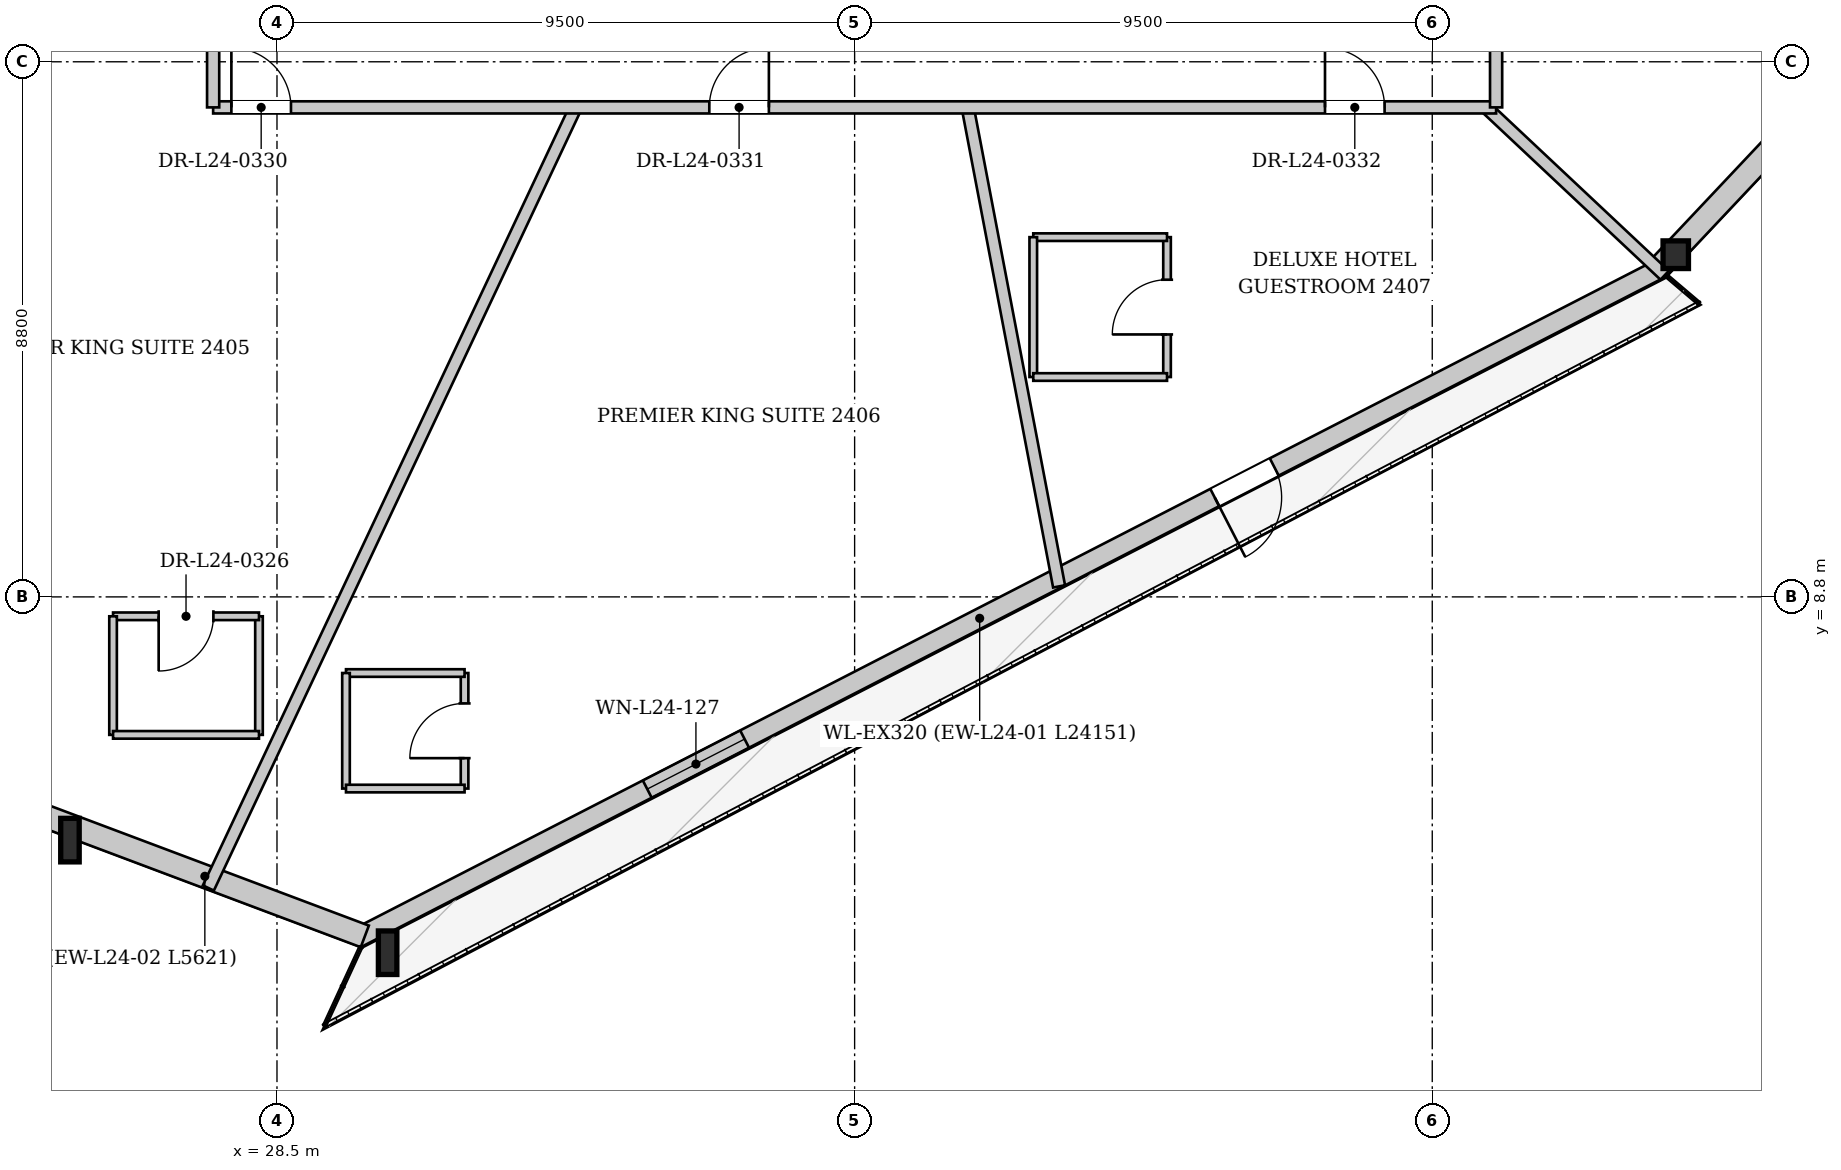
"""IFC4 building model, lengths in metres.
Left out: names, types, materials, properties, quantities, classifications, styles, units other than length and angle.
Written with IfcOpenShell. Run it as: python <this file> out.ifc"""

import sys

from ifc_helpers import new_model, si_unit, direction, frame, frame_2d, origin, origin_2d, place, context, subcontext, project, spatial, rectangle, i_section, extrude, source, transform, mapped, element, fill, save


model = new_model("IFC4")
c1 = context("Model", 3, precision=1e-05, world=origin(), true_north=direction((0.0, 1.0)))
c2 = subcontext(c1, "Body", "Model", "MODEL_VIEW")
j1 = project(units=[si_unit("LENGTHUNIT", "METRE"), si_unit("PLANEANGLEUNIT", "RADIAN")], contexts=[c1])
p1 = place(None, origin())
s1 = spatial("IfcSite", under=j1, at=p1, CompositionType="ELEMENT")
p2 = place(p1, origin())
s2 = spatial("IfcBuilding", under=s1, at=p2, CompositionType="ELEMENT")
p3 = place(p2, frame((0.0, 0.0, 95.05)))
s3 = spatial("IfcBuildingStorey", under=s2, at=p3, CompositionType="ELEMENT", Elevation=95.05)
m1 = source(origin(), c2, "Body", "SweptSolid", [
    extrude(i_section(OverallWidth=0.304, OverallDepth=0.716, WebThickness=0.021, FlangeThickness=0.04, at=origin_2d()), origin(), (0.0, 0.0, 1.0), 3.544),
])
p4 = place(p3, frame((24.616, 5.016, 0.0), z_axis=(0.270218966562, -0.122056591575, 0.955030836446), x_axis=(0.411648964628, 0.911342487718, 0.0)))
e1 = element("IfcColumn", 1, at=p4, inside=s3, PredefinedType="COLUMN", context=c2, shape_type="MappedRepresentation", body=[
    mapped(m1, transform((0.0, 0.0, 0.0), x_axis=(1.0, 0.0, 0.0), y_axis=(0.0, 1.0, 0.0), z_axis=(0.0, 0.0, 1.0), scale=1.0)),
])
m2 = source(origin(), c2, "Body", "SweptSolid", [
    extrude(i_section(OverallWidth=0.304, OverallDepth=0.716, WebThickness=0.021, FlangeThickness=0.04, at=origin_2d()), origin(), (0.0, 0.0, 1.0), 3.503),
])
p5 = place(p3, frame((29.877, 3.039, 0.0), z_axis=(0.25241508532, -0.051570172042, 0.966243831576), x_axis=(0.200171996635, 0.979760772721, 0.0)))
e2 = element("IfcColumn", 2, at=p5, inside=s3, PredefinedType="COLUMN", context=c2, shape_type="MappedRepresentation", body=[
    mapped(m2, transform((0.0, 0.0, 0.0), x_axis=(1.0, 0.0, 0.0), y_axis=(0.0, 1.0, 0.0), z_axis=(0.0, 0.0, 1.0), scale=1.0)),
])
m3 = source(origin(), c2, "Body", "SweptSolid", [
    extrude(i_section(OverallWidth=0.418, OverallDepth=0.455, WebThickness=0.038, FlangeThickness=0.059, at=origin_2d()), origin(), (0.0, 0.0, 1.0), 3.47),
])
p6 = place(p3, frame((51.359, 14.074, 0.0), z_axis=(0.083866504635, 0.203334059058, 0.975510978835), x_axis=(-0.924452695852, 0.381296752061, 0.0)))
e3 = element("IfcColumn", 3, at=p6, inside=s3, PredefinedType="COLUMN", context=c2, shape_type="MappedRepresentation", body=[
    mapped(m3, transform((0.0, 0.0, 0.0), x_axis=(1.0, 0.0, 0.0), y_axis=(0.0, 1.0, 0.0), z_axis=(0.0, 0.0, 1.0), scale=1.0)),
])
p7 = place(p3, frame((51.286, 14.217, 0.0), z_axis=(0.0, 0.0, 1.0), x_axis=(-0.889491175816, -0.456952347785, 0.0)))
e4 = element("IfcWall", 4, at=p7, inside=s3, PredefinedType="SOLIDWALL", context=c2, shape_type="SweptSolid", body=[
    extrude(rectangle(XDim=24.151, YDim=0.32, at=frame_2d((12.075, 0.0))), origin(), (0.0, 0.0, 1.0), 2.692),
])
p8 = place(p7, frame((7.178, 0.0, 0.0)))
e5 = element("IfcOpeningElement", 5, at=p8, cuts=e4, PredefinedType="OPENING", context=c2, shape_type="SweptSolid", body=[
    extrude(rectangle(XDim=1.1, YDim=2.3, at=frame_2d((0.55, 1.15))), frame((0.0, 0.17, 0.0), z_axis=(0.0, -1.0, 0.0), x_axis=(1.0, 0.0, 0.0)), (0.0, 0.0, 1.0), 0.34),
])
p9 = place(p7, frame((16.971, 0.0, 0.372)))
e6 = element("IfcOpeningElement", 6, at=p9, cuts=e4, PredefinedType="OPENING", context=c2, shape_type="SweptSolid", body=[
    extrude(rectangle(XDim=1.8, YDim=2.2, at=frame_2d((0.9, 1.1))), frame((0.0, 0.17, 0.0), z_axis=(0.0, -1.0, 0.0), x_axis=(1.0, 0.0, 0.0)), (0.0, 0.0, 1.0), 0.34),
])
p10 = place(p3, frame((29.944, 3.217, 0.0), z_axis=(0.0, 0.0, 1.0), x_axis=(-0.936080825312, 0.351785003211, 0.0)))
e7 = element("IfcWall", 7, at=p10, inside=s3, PredefinedType="SOLIDWALL", context=c2, shape_type="SweptSolid", body=[
    extrude(rectangle(XDim=5.621, YDim=0.38, at=frame_2d((2.811, 0.0))), origin(), (0.0, 0.0, 1.0), 2.692),
])
p11 = place(p3, frame((67.781, 31.783, 0.0), z_axis=(0.0, 0.0, 1.0), x_axis=(-0.68571495336, -0.727870182614, 0.0)))
e8 = element("IfcWall", 8, at=p11, inside=s3, PredefinedType="SOLIDWALL", context=c2, shape_type="SweptSolid", body=[
    extrude(rectangle(XDim=24.15, YDim=0.38, at=frame_2d((12.075, 0.0))), origin(), (0.0, 0.0, 1.0), 2.692),
])
p12 = place(p11, frame((5.662, 0.0, 0.322)))
e9 = element("IfcOpeningElement", 9, at=p12, cuts=e8, PredefinedType="OPENING", context=c2, shape_type="SweptSolid", body=[
    extrude(rectangle(XDim=2.2, YDim=2.25, at=frame_2d((1.1, 1.125))), frame((0.0, 0.2, 0.0), z_axis=(0.0, -1.0, 0.0), x_axis=(1.0, 0.0, 0.0)), (0.0, 0.0, 1.0), 0.4),
])
p13 = place(p11, frame((16.288, 0.0, 0.322)))
e10 = element("IfcOpeningElement", 10, at=p13, cuts=e8, PredefinedType="OPENING", context=c2, shape_type="SweptSolid", body=[
    extrude(rectangle(XDim=2.2, YDim=2.25, at=frame_2d((1.1, 1.125))), frame((0.0, 0.2, 0.0), z_axis=(0.0, -1.0, 0.0), x_axis=(1.0, 0.0, 0.0)), (0.0, 0.0, 1.0), 0.4),
])
p14 = place(p3, frame((27.45, 20.8, 0.0), z_axis=(0.0, 0.0, 1.0), x_axis=(-0.876309701185, -0.481748178625, 0.0)))
e11 = element("IfcWall", 11, at=p14, inside=s3, PredefinedType="PARTITIONING", context=c2, shape_type="SweptSolid", body=[
    extrude(rectangle(XDim=9.176, YDim=0.2, at=frame_2d((4.588, 0.0))), origin(), (0.0, 0.0, 1.0), 3.3),
])
p15 = place(p3, frame((33.412, 16.85, 0.0), z_axis=(0.0, 0.0, 1.0), x_axis=(-0.425776318431, -0.904828451511, 0.0)))
e12 = element("IfcWall", 12, at=p15, inside=s3, PredefinedType="PARTITIONING", context=c2, shape_type="SweptSolid", body=[
    extrude(rectangle(XDim=14.188, YDim=0.2, at=frame_2d((7.094, 0.0))), origin(), (0.0, 0.0, 1.0), 3.3),
])
p16 = place(p3, frame((39.86, 16.85, 0.0), z_axis=(0.0, 0.0, 1.0), x_axis=(0.187379297004, -0.982287635601, 0.0)))
e13 = element("IfcWall", 13, at=p16, inside=s3, PredefinedType="PARTITIONING", context=c2, shape_type="SweptSolid", body=[
    extrude(rectangle(XDim=8.02, YDim=0.2, at=frame_2d((4.01, 0.0))), origin(), (0.0, 0.0, 1.0), 3.3),
])
p17 = place(p3, frame((48.383, 16.85, 0.0), z_axis=(0.0, 0.0, 1.0), x_axis=(0.728946019142, -0.684571180505, 0.0)))
e14 = element("IfcWall", 14, at=p17, inside=s3, PredefinedType="PARTITIONING", context=c2, shape_type="SweptSolid", body=[
    extrude(rectangle(XDim=4.033, YDim=0.2, at=frame_2d((2.016, 0.0))), origin(), (0.0, 0.0, 1.0), 3.3),
])
p18 = place(p3, frame((28.204, 6.531, 0.0), z_axis=(0.0, 0.0, 1.0), x_axis=(0.0, 1.0, 0.0)))
e15 = element("IfcWall", 15, at=p18, inside=s3, PredefinedType="PARTITIONING", context=c2, shape_type="SweptSolid", body=[
    extrude(rectangle(XDim=1.95, YDim=0.125, at=frame_2d((0.975, 0.0))), origin(), (0.0, 0.0, 1.0), 3.3),
])
p19 = place(p3, frame((28.204, 8.481, 0.0), z_axis=(0.0, 0.0, 1.0), x_axis=(-1.0, 0.0, 0.0)))
e16 = element("IfcWall", 16, at=p19, inside=s3, PredefinedType="PARTITIONING", context=c2, shape_type="SweptSolid", body=[
    extrude(rectangle(XDim=2.4, YDim=0.125, at=frame_2d((1.2, 0.0))), origin(), (0.0, 0.0, 1.0), 3.3),
])
p20 = place(p19, frame((0.75, 0.0, 0.0)))
e17 = element("IfcOpeningElement", 17, at=p20, cuts=e16, PredefinedType="OPENING", context=c2, shape_type="SweptSolid", body=[
    extrude(rectangle(XDim=0.9, YDim=2.1, at=frame_2d((0.45, 1.05))), frame((0.0, 0.073, 0.0), z_axis=(0.0, -1.0, 0.0), x_axis=(1.0, 0.0, 0.0)), (0.0, 0.0, 1.0), 0.145),
])
p21 = place(p3, frame((25.804, 8.481, 0.0), z_axis=(0.0, 0.0, 1.0), x_axis=(0.0, -1.0, 0.0)))
e18 = element("IfcWall", 18, at=p21, inside=s3, PredefinedType="PARTITIONING", context=c2, shape_type="SweptSolid", body=[
    extrude(rectangle(XDim=1.95, YDim=0.125, at=frame_2d((0.975, 0.0))), origin(), (0.0, 0.0, 1.0), 3.3),
])
p22 = place(p3, frame((25.804, 6.531, 0.0), z_axis=(0.0, 0.0, 1.0), x_axis=(1.0, 0.0, 0.0)))
e19 = element("IfcWall", 19, at=p22, inside=s3, PredefinedType="PARTITIONING", context=c2, shape_type="SweptSolid", body=[
    extrude(rectangle(XDim=2.4, YDim=0.125, at=frame_2d((1.2, 0.0))), origin(), (0.0, 0.0, 1.0), 3.3),
])
p23 = place(p3, frame((31.585, 5.648, 0.0), z_axis=(0.0, 0.0, 1.0), x_axis=(0.0, 1.0, 0.0)))
e20 = element("IfcWall", 20, at=p23, inside=s3, PredefinedType="PARTITIONING", context=c2, shape_type="SweptSolid", body=[
    extrude(rectangle(XDim=1.9, YDim=0.125, at=frame_2d((0.95, 0.0))), origin(), (0.0, 0.0, 1.0), 2.795),
])
p24 = place(p23, frame((0.5, 0.0, 0.0)))
e21 = element("IfcOpeningElement", 21, at=p24, cuts=e20, PredefinedType="OPENING", context=c2, shape_type="SweptSolid", body=[
    extrude(rectangle(XDim=0.9, YDim=2.1, at=frame_2d((0.45, 1.05))), frame((0.0, 0.073, 0.0), z_axis=(0.0, -1.0, 0.0), x_axis=(1.0, 0.0, 0.0)), (0.0, 0.0, 1.0), 0.145),
])
p25 = place(p3, frame((31.585, 7.548, 0.0), z_axis=(0.0, 0.0, 1.0), x_axis=(-1.0, 0.0, 0.0)))
e22 = element("IfcWall", 22, at=p25, inside=s3, PredefinedType="PARTITIONING", context=c2, shape_type="SweptSolid", body=[
    extrude(rectangle(XDim=1.95, YDim=0.125, at=frame_2d((0.975, 0.0))), origin(), (0.0, 0.0, 1.0), 3.3),
])
p26 = place(p3, frame((29.635, 7.548, 0.0), z_axis=(0.0, 0.0, 1.0), x_axis=(0.0, -1.0, 0.0)))
e23 = element("IfcWall", 23, at=p26, inside=s3, PredefinedType="PARTITIONING", context=c2, shape_type="SweptSolid", body=[
    extrude(rectangle(XDim=1.9, YDim=0.125, at=frame_2d((0.95, 0.0))), origin(), (0.0, 0.0, 1.0), 3.3),
])
p27 = place(p3, frame((29.635, 5.648, 0.0), z_axis=(0.0, 0.0, 1.0), x_axis=(1.0, 0.0, 0.0)))
e24 = element("IfcWall", 24, at=p27, inside=s3, PredefinedType="PARTITIONING", context=c2, shape_type="SweptSolid", body=[
    extrude(rectangle(XDim=1.95, YDim=0.125, at=frame_2d((0.975, 0.0))), origin(), (0.0, 0.0, 1.0), 3.3),
])
p28 = place(p3, frame((43.138, 12.416, 0.0), z_axis=(0.0, 0.0, 1.0), x_axis=(0.0, 1.0, 0.0)))
e25 = element("IfcWall", 25, at=p28, inside=s3, PredefinedType="PARTITIONING", context=c2, shape_type="SweptSolid", body=[
    extrude(rectangle(XDim=2.3, YDim=0.125, at=frame_2d((1.15, 0.0))), origin(), (0.0, 0.0, 1.0), 3.3),
])
p29 = place(p28, frame((0.7, 0.0, 0.0)))
e26 = element("IfcOpeningElement", 26, at=p29, cuts=e25, PredefinedType="OPENING", context=c2, shape_type="SweptSolid", body=[
    extrude(rectangle(XDim=0.9, YDim=2.1, at=frame_2d((0.45, 1.05))), frame((0.0, 0.073, 0.0), z_axis=(0.0, -1.0, 0.0), x_axis=(1.0, 0.0, 0.0)), (0.0, 0.0, 1.0), 0.145),
])
p30 = place(p3, frame((43.138, 14.716, 0.0), z_axis=(0.0, 0.0, 1.0), x_axis=(-1.0, 0.0, 0.0)))
e27 = element("IfcWall", 27, at=p30, inside=s3, PredefinedType="PARTITIONING", context=c2, shape_type="SweptSolid", body=[
    extrude(rectangle(XDim=2.2, YDim=0.125, at=frame_2d((1.1, 0.0))), origin(), (0.0, 0.0, 1.0), 3.3),
])
p31 = place(p3, frame((40.938, 14.716, 0.0), z_axis=(0.0, 0.0, 1.0), x_axis=(0.0, -1.0, 0.0)))
e28 = element("IfcWall", 28, at=p31, inside=s3, PredefinedType="PARTITIONING", context=c2, shape_type="SweptSolid", body=[
    extrude(rectangle(XDim=2.3, YDim=0.125, at=frame_2d((1.15, 0.0))), origin(), (0.0, 0.0, 1.0), 3.3),
])
p32 = place(p3, frame((40.938, 12.416, 0.0), z_axis=(0.0, 0.0, 1.0), x_axis=(1.0, 0.0, 0.0)))
e29 = element("IfcWall", 29, at=p32, inside=s3, PredefinedType="PARTITIONING", context=c2, shape_type="SweptSolid", body=[
    extrude(rectangle(XDim=2.2, YDim=0.125, at=frame_2d((1.1, 0.0))), origin(), (0.0, 0.0, 1.0), 3.3),
])
p33 = place(p3, frame((27.45, 16.85, 0.0), z_axis=(0.0, 0.0, 1.0), x_axis=(1.0, 0.0, 0.0)))
e30 = element("IfcWall", 30, at=p33, inside=s3, PredefinedType="PARTITIONING", context=c2, shape_type="SweptSolid", body=[
    extrude(rectangle(XDim=21.1, YDim=0.2, at=frame_2d((10.55, 0.0))), origin(), (0.0, 0.0, 1.0), 3.3),
])
p34 = place(p33, frame((0.3, 0.0, 0.0)))
e31 = element("IfcOpeningElement", 31, at=p34, cuts=e30, PredefinedType="OPENING", context=c2, shape_type="SweptSolid", body=[
    extrude(rectangle(XDim=0.98, YDim=2.15, at=frame_2d((0.49, 1.075))), frame((0.0, 0.11, 0.0), z_axis=(0.0, -1.0, 0.0), x_axis=(1.0, 0.0, 0.0)), (0.0, 0.0, 1.0), 0.22),
])
p35 = place(p33, frame((8.16, 0.0, 0.0)))
e32 = element("IfcOpeningElement", 32, at=p35, cuts=e30, PredefinedType="OPENING", context=c2, shape_type="SweptSolid", body=[
    extrude(rectangle(XDim=0.98, YDim=2.15, at=frame_2d((0.49, 1.075))), frame((0.0, 0.11, 0.0), z_axis=(0.0, -1.0, 0.0), x_axis=(1.0, 0.0, 0.0)), (0.0, 0.0, 1.0), 0.22),
])
p36 = place(p33, frame((18.286, 0.0, 0.0)))
e33 = element("IfcOpeningElement", 33, at=p36, cuts=e30, PredefinedType="OPENING", context=c2, shape_type="SweptSolid", body=[
    extrude(rectangle(XDim=0.98, YDim=2.15, at=frame_2d((0.49, 1.075))), frame((0.0, 0.11, 0.0), z_axis=(0.0, -1.0, 0.0), x_axis=(1.0, 0.0, 0.0)), (0.0, 0.0, 1.0), 0.22),
])
p37 = place(p3, frame((27.45, 16.85, 0.0), z_axis=(0.0, 0.0, 1.0), x_axis=(0.0, 1.0, 0.0)))
e34 = element("IfcWall", 34, at=p37, inside=s3, PredefinedType="PARTITIONING", context=c2, shape_type="SweptSolid", body=[
    extrude(rectangle(XDim=19.5, YDim=0.2, at=frame_2d((9.75, 0.0))), origin(), (0.0, 0.0, 1.0), 3.3),
])
p38 = place(p37, frame((15.435, 0.0, 0.0)))
e35 = element("IfcOpeningElement", 35, at=p38, cuts=e34, PredefinedType="OPENING", context=c2, shape_type="SweptSolid", body=[
    extrude(rectangle(XDim=0.98, YDim=2.15, at=frame_2d((0.49, 1.075))), frame((0.0, 0.11, 0.0), z_axis=(0.0, -1.0, 0.0), x_axis=(1.0, 0.0, 0.0)), (0.0, 0.0, 1.0), 0.22),
])
p39 = place(p37, frame((6.365, 0.0, 0.0)))
e36 = element("IfcOpeningElement", 36, at=p39, cuts=e34, PredefinedType="OPENING", context=c2, shape_type="SweptSolid", body=[
    extrude(rectangle(XDim=0.98, YDim=2.15, at=frame_2d((0.49, 1.075))), frame((0.0, 0.11, 0.0), z_axis=(0.0, -1.0, 0.0), x_axis=(1.0, 0.0, 0.0)), (0.0, 0.0, 1.0), 0.22),
])
p40 = place(p3, frame((48.55, 16.85, 0.0), z_axis=(0.0, 0.0, 1.0), x_axis=(0.0, 1.0, 0.0)))
e37 = element("IfcWall", 37, at=p40, inside=s3, PredefinedType="PARTITIONING", context=c2, shape_type="SweptSolid", body=[
    extrude(rectangle(XDim=19.5, YDim=0.2, at=frame_2d((9.75, 0.0))), origin(), (0.0, 0.0, 1.0), 3.3),
])
p41 = place(p40, frame((3.35, 0.0, 0.0)))
e38 = element("IfcOpeningElement", 38, at=p41, cuts=e37, PredefinedType="OPENING", context=c2, shape_type="SweptSolid", body=[
    extrude(rectangle(XDim=0.98, YDim=2.15, at=frame_2d((0.49, 1.075))), frame((0.0, 0.11, 0.0), z_axis=(0.0, -1.0, 0.0), x_axis=(1.0, 0.0, 0.0)), (0.0, 0.0, 1.0), 0.22),
])
p42 = place(p40, frame((11.352, 0.0, 0.0)))
e39 = element("IfcOpeningElement", 39, at=p42, cuts=e37, PredefinedType="OPENING", context=c2, shape_type="SweptSolid", body=[
    extrude(rectangle(XDim=0.98, YDim=2.15, at=frame_2d((0.49, 1.075))), frame((0.0, 0.11, 0.0), z_axis=(0.0, -1.0, 0.0), x_axis=(1.0, 0.0, 0.0)), (0.0, 0.0, 1.0), 0.22),
])
m4 = source(origin(), c2, "Body", "SweptSolid", [
    extrude(rectangle(XDim=1.1, YDim=2.3, at=frame_2d((0.55, 1.15))), frame((0.0, 0.025, 0.0), z_axis=(0.0, -1.0, 0.0), x_axis=(1.0, 0.0, 0.0)), (0.0, 0.0, 1.0), 0.05),
])
p43 = place(p8, origin())
e40 = element("IfcDoor", 40, at=p43, inside=s3, OperationType="SINGLE_SWING_RIGHT", PredefinedType="DOOR", context=c2, shape_type="MappedRepresentation", body=[
    mapped(m4, transform((0.0, 0.0, 0.0), x_axis=(1.0, 0.0, 0.0), y_axis=(0.0, 1.0, 0.0), z_axis=(0.0, 0.0, 1.0), scale=1.0)),
])
fill(e5, e40)
m5 = source(origin(), c2, "Body", "SweptSolid", [
    extrude(rectangle(XDim=1.8, YDim=2.2, at=frame_2d((0.9, 1.1))), frame((0.0, 0.03, 0.0), z_axis=(0.0, -1.0, 0.0), x_axis=(1.0, 0.0, 0.0)), (0.0, 0.0, 1.0), 0.06),
])
p44 = place(p9, origin())
e41 = element("IfcWindow", 41, at=p44, inside=s3, PartitioningType="SINGLE_PANEL", PredefinedType="WINDOW", context=c2, shape_type="MappedRepresentation", body=[
    mapped(m5, transform((0.0, 0.0, 0.0), x_axis=(1.0, 0.0, 0.0), y_axis=(0.0, 1.0, 0.0), z_axis=(0.0, 0.0, 1.0), scale=1.0)),
])
fill(e6, e41)
m6 = source(origin(), c2, "Body", "SweptSolid", [
    extrude(rectangle(XDim=0.9, YDim=2.1, at=frame_2d((0.45, 1.05))), frame((0.0, 0.025, 0.0), z_axis=(0.0, -1.0, 0.0), x_axis=(1.0, 0.0, 0.0)), (0.0, 0.0, 1.0), 0.05),
])
p45 = place(p20, origin())
e42 = element("IfcDoor", 42, at=p45, inside=s3, OperationType="SINGLE_SWING_RIGHT", PredefinedType="DOOR", context=c2, shape_type="MappedRepresentation", body=[
    mapped(m6, transform((0.0, 0.0, 0.0), x_axis=(1.0, 0.0, 0.0), y_axis=(0.0, 1.0, 0.0), z_axis=(0.0, 0.0, 1.0), scale=1.0)),
])
fill(e17, e42)
p46 = place(p24, origin())
e43 = element("IfcDoor", 43, at=p46, inside=s3, OperationType="SINGLE_SWING_LEFT", PredefinedType="DOOR", context=c2, shape_type="MappedRepresentation", body=[
    mapped(m6, transform((0.0, 0.0, 0.0), x_axis=(1.0, 0.0, 0.0), y_axis=(0.0, 1.0, 0.0), z_axis=(0.0, 0.0, 1.0), scale=1.0)),
])
fill(e21, e43)
p47 = place(p29, origin())
e44 = element("IfcDoor", 44, at=p47, inside=s3, OperationType="SINGLE_SWING_LEFT", PredefinedType="DOOR", context=c2, shape_type="MappedRepresentation", body=[
    mapped(m6, transform((0.0, 0.0, 0.0), x_axis=(1.0, 0.0, 0.0), y_axis=(0.0, 1.0, 0.0), z_axis=(0.0, 0.0, 1.0), scale=1.0)),
])
fill(e26, e44)
m7 = source(origin(), c2, "Body", "SweptSolid", [
    extrude(rectangle(XDim=0.98, YDim=2.15, at=frame_2d((0.49, 1.075))), frame((0.0, 0.025, 0.0), z_axis=(0.0, -1.0, 0.0), x_axis=(1.0, 0.0, 0.0)), (0.0, 0.0, 1.0), 0.05),
])
p48 = place(p34, origin())
e45 = element("IfcDoor", 45, at=p48, inside=s3, OperationType="SINGLE_SWING_LEFT", PredefinedType="DOOR", context=c2, shape_type="MappedRepresentation", body=[
    mapped(m7, transform((0.0, 0.0, 0.0), x_axis=(1.0, 0.0, 0.0), y_axis=(0.0, 1.0, 0.0), z_axis=(0.0, 0.0, 1.0), scale=1.0)),
])
fill(e31, e45)
p49 = place(p35, origin())
e46 = element("IfcDoor", 46, at=p49, inside=s3, OperationType="SINGLE_SWING_RIGHT", PredefinedType="DOOR", context=c2, shape_type="MappedRepresentation", body=[
    mapped(m7, transform((0.0, 0.0, 0.0), x_axis=(1.0, 0.0, 0.0), y_axis=(0.0, 1.0, 0.0), z_axis=(0.0, 0.0, 1.0), scale=1.0)),
])
fill(e32, e46)
p50 = place(p36, origin())
e47 = element("IfcDoor", 47, at=p50, inside=s3, OperationType="SINGLE_SWING_LEFT", PredefinedType="DOOR", context=c2, shape_type="MappedRepresentation", body=[
    mapped(m7, transform((0.0, 0.0, 0.0), x_axis=(1.0, 0.0, 0.0), y_axis=(0.0, 1.0, 0.0), z_axis=(0.0, 0.0, 1.0), scale=1.0)),
])
fill(e33, e47)
save(model, sys.argv[1])
